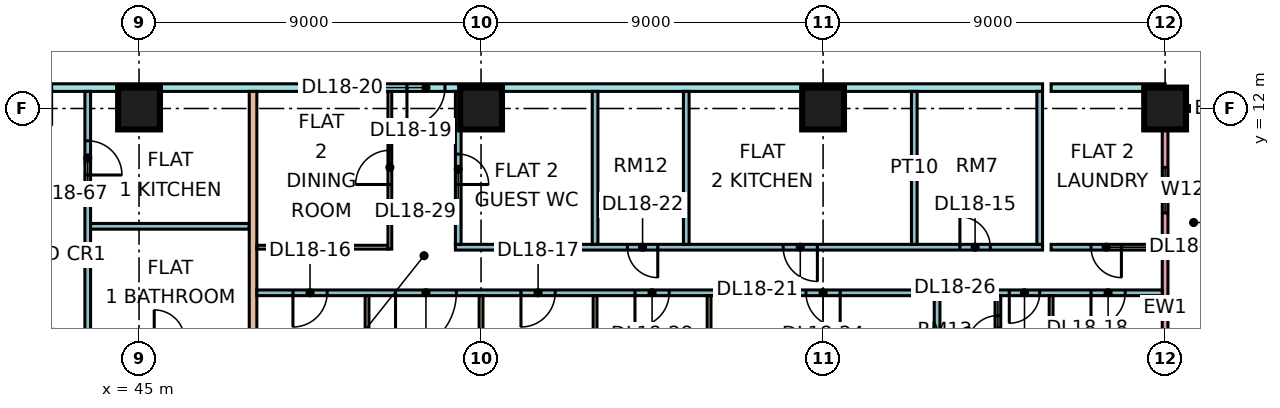
"""IFC4 building model, lengths in metres.
Left out: names, types, materials, properties, quantities, classifications, styles, units other than length and angle.
Written with IfcOpenShell. Run it as: python <this file> out.ifc"""

import sys

from ifc_helpers import new_model, si_unit, direction, frame, frame_2d, origin, origin_2d, place, context, subcontext, project, spatial, rectangle, extrude, element, fill, save


model = new_model("IFC4")
c1 = context("Model", 3, precision=1e-05, world=origin(), true_north=direction((0.0, 1.0)))
c2 = subcontext(c1, "Body", "Model", "MODEL_VIEW")
j1 = project(units=[si_unit("LENGTHUNIT", "METRE"), si_unit("PLANEANGLEUNIT", "RADIAN")], contexts=[c1])
p1 = place(None, origin())
s1 = spatial("IfcSite", under=j1, at=p1, CompositionType="ELEMENT")
p2 = place(p1, origin())
s2 = spatial("IfcBuilding", under=s1, at=p2, CompositionType="ELEMENT")
p3 = place(p2, frame((0.0, 0.0, 82.65)))
s3 = spatial("IfcBuildingStorey", under=s2, at=p3, CompositionType="ELEMENT", Elevation=82.65)
for number, where, z_axis, x_axis in (
    (1, (45.0, 12.0, 0.0), (0.0, 0.0, 1.0), (1.0, 0.0, 0.0)),
    (2, (54.0, 12.0, 0.0), (0.0, 0.0, 1.0), (1.0, 0.0, 0.0)),
    (3, (63.0, 12.0, 0.0), (0.0, 0.0, 1.0), (1.0, 0.0, 0.0)),
    (4, (72.0, 12.0, 0.0), (0.0, 0.0, 1.0), (1.0, 0.0, 0.0)),
):
    element("IfcColumn", number, at=place(p3, frame(where, z_axis=z_axis, x_axis=x_axis)), inside=s3, PredefinedType="COLUMN", context=c2, shape_type="SweptSolid", body=[
        extrude(rectangle(XDim=1.1, YDim=1.1, at=origin_2d()), origin(), (0.0, 0.0, 1.0), 3.75),
    ])
p4 = place(p3, frame((72.0, 1.575, 0.0), z_axis=(0.0, 0.0, 1.0), x_axis=(0.0, 1.0, 0.0)))
e5 = element("IfcWall", 5, at=p4, inside=s3, PredefinedType="SOLIDWALL", context=c2, shape_type="SweptSolid", body=[
    extrude(rectangle(XDim=10.35, YDim=0.15, at=frame_2d((5.175, 0.0))), origin(), (0.0, 0.0, 1.0), 3.3),
])
p5 = place(p4, frame((1.887, 0.0, 0.0)))
e6 = element("IfcOpeningElement", 6, at=p5, cuts=e5, PredefinedType="OPENING", context=c2, shape_type="SweptSolid", body=[
    extrude(rectangle(XDim=1.8, YDim=2.4, at=frame_2d((0.9, 1.2))), frame((0.0, 0.085, 0.0), z_axis=(0.0, -1.0, 0.0), x_axis=(1.0, 0.0, 0.0)), (0.0, 0.0, 1.0), 0.17),
])
p6 = place(p4, frame((7.675, 0.0, 1.7)))
e7 = element("IfcOpeningElement", 7, at=p6, cuts=e5, PredefinedType="OPENING", context=c2, shape_type="SweptSolid", body=[
    extrude(rectangle(XDim=1.2, YDim=0.9, at=frame_2d((0.6, 0.45))), frame((0.0, 0.085, 0.0), z_axis=(0.0, -1.0, 0.0), x_axis=(1.0, 0.0, 0.0)), (0.0, 0.0, 1.0), 0.17),
])
p7 = place(p3, frame((73.5, 12.0, 0.0), z_axis=(0.0, 0.0, 1.0), x_axis=(-1.0, 0.0, 0.0)))
e8 = element("IfcWall", 8, at=p7, inside=s3, PredefinedType="SOLIDWALL", context=c2, shape_type="SweptSolid", body=[
    extrude(rectangle(XDim=1.5, YDim=0.15, at=frame_2d((0.75, 0.0))), origin(), (0.0, 0.0, 1.0), 3.3),
])
p8 = place(p3, frame((40.65, 12.55, 0.0), z_axis=(0.0, 0.0, 1.0), x_axis=(1.0, 0.0, 0.0)))
e9 = element("IfcWall", 9, at=p8, inside=s3, PredefinedType="PARTITIONING", context=c2, shape_type="SweptSolid", body=[
    extrude(rectangle(XDim=28.125, YDim=0.2, at=frame_2d((14.062, 0.0))), origin(), (0.0, 0.0, 1.0), 3.3),
])
p9 = place(p8, frame((11.4, 0.0, 0.0)))
e10 = element("IfcOpeningElement", 10, at=p9, cuts=e9, PredefinedType="OPENING", context=c2, shape_type="SweptSolid", body=[
    extrude(rectangle(XDim=1.0, YDim=2.1, at=frame_2d((0.5, 1.05))), frame((0.0, 0.11, 0.0), z_axis=(0.0, -1.0, 0.0), x_axis=(1.0, 0.0, 0.0)), (0.0, 0.0, 1.0), 0.22),
])
p10 = place(p8, frame((1.05, 0.0, 0.0)))
e11 = element("IfcOpeningElement", 11, at=p10, cuts=e9, PredefinedType="OPENING", context=c2, shape_type="SweptSolid", body=[
    extrude(rectangle(XDim=1.0, YDim=2.1, at=frame_2d((0.5, 1.05))), frame((0.0, 0.11, 0.0), z_axis=(0.0, -1.0, 0.0), x_axis=(1.0, 0.0, 0.0)), (0.0, 0.0, 1.0), 0.22),
])
p11 = place(p3, frame((43.65, 5.825, 0.0), z_axis=(0.0, 0.0, 1.0), x_axis=(0.0, 1.0, 0.0)))
e12 = element("IfcWall", 12, at=p11, inside=s3, PredefinedType="PARTITIONING", context=c2, shape_type="SweptSolid", body=[
    extrude(rectangle(XDim=6.625, YDim=0.15, at=frame_2d((3.312, 0.0))), origin(), (0.0, 0.0, 1.0), 3.3),
])
p12 = place(p11, frame((4.425, 0.0, 0.0)))
e13 = element("IfcOpeningElement", 13, at=p12, cuts=e12, PredefinedType="OPENING", context=c2, shape_type="SweptSolid", body=[
    extrude(rectangle(XDim=0.9, YDim=2.1, at=frame_2d((0.45, 1.05))), frame((0.0, 0.085, 0.0), z_axis=(0.0, -1.0, 0.0), x_axis=(1.0, 0.0, 0.0)), (0.0, 0.0, 1.0), 0.17),
])
p13 = place(p3, frame((43.725, 8.9, 0.0), z_axis=(0.0, 0.0, 1.0), x_axis=(1.0, 0.0, 0.0)))
e14 = element("IfcWall", 14, at=p13, inside=s3, PredefinedType="PARTITIONING", context=c2, shape_type="SweptSolid", body=[
    extrude(rectangle(XDim=4.175, YDim=0.15, at=frame_2d((2.087, 0.0))), origin(), (0.0, 0.0, 1.0), 3.3),
])
p14 = place(p3, frame((48.0, 0.0, 0.0), z_axis=(0.0, 0.0, 1.0), x_axis=(0.0, 1.0, 0.0)))
e15 = element("IfcWall", 15, at=p14, inside=s3, PredefinedType="PARTITIONING", context=c2, shape_type="SweptSolid", body=[
    extrude(rectangle(XDim=12.45, YDim=0.2, at=frame_2d((6.225, 0.0))), origin(), (0.0, 0.0, 1.0), 3.3),
])
p15 = place(p3, frame((48.1, 7.15, 0.0), z_axis=(0.0, 0.0, 1.0), x_axis=(1.0, 0.0, 0.0)))
e16 = element("IfcWall", 16, at=p15, inside=s3, PredefinedType="PARTITIONING", context=c2, shape_type="SweptSolid", body=[
    extrude(rectangle(XDim=23.826, YDim=0.15, at=frame_2d((11.913, 0.0))), origin(), (0.0, 0.0, 1.0), 3.3),
])
p16 = place(p15, frame((0.95, 0.0, 0.0)))
e17 = element("IfcOpeningElement", 17, at=p16, cuts=e16, PredefinedType="OPENING", context=c2, shape_type="SweptSolid", body=[
    extrude(rectangle(XDim=0.9, YDim=2.1, at=frame_2d((0.45, 1.05))), frame((0.0, 0.085, 0.0), z_axis=(0.0, -1.0, 0.0), x_axis=(1.0, 0.0, 0.0)), (0.0, 0.0, 1.0), 0.17),
])
p17 = place(p15, frame((6.95, 0.0, 0.0)))
e18 = element("IfcOpeningElement", 18, at=p17, cuts=e16, PredefinedType="OPENING", context=c2, shape_type="SweptSolid", body=[
    extrude(rectangle(XDim=0.9, YDim=2.1, at=frame_2d((0.45, 1.05))), frame((0.0, 0.085, 0.0), z_axis=(0.0, -1.0, 0.0), x_axis=(1.0, 0.0, 0.0)), (0.0, 0.0, 1.0), 0.17),
])
p18 = place(p15, frame((21.95, 0.0, 0.0)))
e19 = element("IfcOpeningElement", 19, at=p18, cuts=e16, PredefinedType="OPENING", context=c2, shape_type="SweptSolid", body=[
    extrude(rectangle(XDim=0.9, YDim=2.1, at=frame_2d((0.45, 1.05))), frame((0.0, 0.085, 0.0), z_axis=(0.0, -1.0, 0.0), x_axis=(1.0, 0.0, 0.0)), (0.0, 0.0, 1.0), 0.17),
])
p19 = place(p15, frame((14.45, 0.0, 0.0)))
e20 = element("IfcOpeningElement", 20, at=p19, cuts=e16, PredefinedType="OPENING", context=c2, shape_type="SweptSolid", body=[
    extrude(rectangle(XDim=0.9, YDim=2.1, at=frame_2d((0.45, 1.05))), frame((0.0, 0.085, 0.0), z_axis=(0.0, -1.0, 0.0), x_axis=(1.0, 0.0, 0.0)), (0.0, 0.0, 1.0), 0.17),
])
p20 = place(p15, frame((19.8, 0.0, 0.0)))
e21 = element("IfcOpeningElement", 21, at=p20, cuts=e16, PredefinedType="OPENING", context=c2, shape_type="SweptSolid", body=[
    extrude(rectangle(XDim=0.8, YDim=2.1, at=frame_2d((0.4, 1.05))), frame((0.0, 0.085, 0.0), z_axis=(0.0, -1.0, 0.0), x_axis=(1.0, 0.0, 0.0)), (0.0, 0.0, 1.0), 0.17),
])
p21 = place(p15, frame((3.65, 0.0, 0.0)))
e22 = element("IfcOpeningElement", 22, at=p21, cuts=e16, PredefinedType="OPENING", context=c2, shape_type="SweptSolid", body=[
    extrude(rectangle(XDim=1.6, YDim=2.1, at=frame_2d((0.8, 1.05))), frame((0.0, 0.085, 0.0), z_axis=(0.0, -1.0, 0.0), x_axis=(1.0, 0.0, 0.0)), (0.0, 0.0, 1.0), 0.17),
])
p22 = place(p15, frame((9.95, 0.0, 0.0)))
e23 = element("IfcOpeningElement", 23, at=p22, cuts=e16, PredefinedType="OPENING", context=c2, shape_type="SweptSolid", body=[
    extrude(rectangle(XDim=0.9, YDim=2.1, at=frame_2d((0.45, 1.05))), frame((0.0, 0.085, 0.0), z_axis=(0.0, -1.0, 0.0), x_axis=(1.0, 0.0, 0.0)), (0.0, 0.0, 1.0), 0.17),
])
p23 = place(p3, frame((48.1, 8.35, 0.0), z_axis=(0.0, 0.0, 1.0), x_axis=(1.0, 0.0, 0.0)))
e24 = element("IfcWall", 24, at=p23, inside=s3, PredefinedType="PARTITIONING", context=c2, shape_type="SweptSolid", body=[
    extrude(rectangle(XDim=3.45, YDim=0.1, at=frame_2d((1.725, 0.0))), origin(), (0.0, 0.0, 1.0), 3.3),
])
p24 = place(p3, frame((51.0, 0.074, 0.0), z_axis=(0.0, 0.0, 1.0), x_axis=(0.0, 1.0, 0.0)))
e25 = element("IfcWall", 25, at=p24, inside=s3, PredefinedType="PARTITIONING", context=c2, shape_type="SweptSolid", body=[
    extrude(rectangle(XDim=7.001, YDim=0.1, at=frame_2d((3.5, 0.0))), origin(), (0.0, 0.0, 1.0), 3.3),
])
p25 = place(p3, frame((51.6, 8.3, 0.0), z_axis=(0.0, 0.0, 1.0), x_axis=(0.0, 1.0, 0.0)))
e26 = element("IfcWall", 26, at=p25, inside=s3, PredefinedType="PARTITIONING", context=c2, shape_type="SweptSolid", body=[
    extrude(rectangle(XDim=4.15, YDim=0.1, at=frame_2d((2.075, 0.0))), origin(), (0.0, 0.0, 1.0), 3.3),
])
p26 = place(p25, frame((1.7, 0.0, 0.0)))
e27 = element("IfcOpeningElement", 27, at=p26, cuts=e26, PredefinedType="OPENING", context=c2, shape_type="SweptSolid", body=[
    extrude(rectangle(XDim=0.9, YDim=2.1, at=frame_2d((0.45, 1.05))), frame((0.0, 0.06, 0.0), z_axis=(0.0, -1.0, 0.0), x_axis=(1.0, 0.0, 0.0)), (0.0, 0.0, 1.0), 0.12),
])
p27 = place(p3, frame((53.325, 8.35, 0.0), z_axis=(0.0, 0.0, 1.0), x_axis=(1.0, 0.0, 0.0)))
e28 = element("IfcWall", 28, at=p27, inside=s3, PredefinedType="PARTITIONING", context=c2, shape_type="SweptSolid", body=[
    extrude(rectangle(XDim=15.45, YDim=0.15, at=frame_2d((7.725, 0.0))), origin(), (0.0, 0.0, 1.0), 3.3),
])
p28 = place(p27, frame((13.275, 0.0, 0.0)))
e29 = element("IfcOpeningElement", 29, at=p28, cuts=e28, PredefinedType="OPENING", context=c2, shape_type="SweptSolid", body=[
    extrude(rectangle(XDim=0.8, YDim=2.1, at=frame_2d((0.4, 1.05))), frame((0.0, 0.085, 0.0), z_axis=(0.0, -1.0, 0.0), x_axis=(1.0, 0.0, 0.0)), (0.0, 0.0, 1.0), 0.17),
])
p29 = place(p27, frame((8.625, 0.0, 0.0)))
e30 = element("IfcOpeningElement", 30, at=p29, cuts=e28, PredefinedType="OPENING", context=c2, shape_type="SweptSolid", body=[
    extrude(rectangle(XDim=0.9, YDim=2.1, at=frame_2d((0.45, 1.05))), frame((0.0, 0.085, 0.0), z_axis=(0.0, -1.0, 0.0), x_axis=(1.0, 0.0, 0.0)), (0.0, 0.0, 1.0), 0.17),
])
p30 = place(p27, frame((4.525, 0.0, 0.0)))
e31 = element("IfcOpeningElement", 31, at=p30, cuts=e28, PredefinedType="OPENING", context=c2, shape_type="SweptSolid", body=[
    extrude(rectangle(XDim=0.8, YDim=2.1, at=frame_2d((0.4, 1.05))), frame((0.0, 0.085, 0.0), z_axis=(0.0, -1.0, 0.0), x_axis=(1.0, 0.0, 0.0)), (0.0, 0.0, 1.0), 0.17),
])
p31 = place(p3, frame((53.4, 8.425, 0.0), z_axis=(0.0, 0.0, 1.0), x_axis=(0.0, 1.0, 0.0)))
e32 = element("IfcWall", 32, at=p31, inside=s3, PredefinedType="PARTITIONING", context=c2, shape_type="SweptSolid", body=[
    extrude(rectangle(XDim=4.025, YDim=0.15, at=frame_2d((2.012, 0.0))), origin(), (0.0, 0.0, 1.0), 3.3),
])
p32 = place(p31, frame((1.575, 0.0, 0.0)))
e33 = element("IfcOpeningElement", 33, at=p32, cuts=e32, PredefinedType="OPENING", context=c2, shape_type="SweptSolid", body=[
    extrude(rectangle(XDim=0.8, YDim=2.1, at=frame_2d((0.4, 1.05))), frame((0.0, 0.085, 0.0), z_axis=(0.0, -1.0, 0.0), x_axis=(1.0, 0.0, 0.0)), (0.0, 0.0, 1.0), 0.17),
])
for number, where, z_axis, x_axis in (
    (34, (54.0, 0.074, 0.0), (0.0, 0.0, 1.0), (0.0, 1.0, 0.0)),
    (35, (57.0, 0.074, 0.0), (0.0, 0.0, 1.0), (0.0, 1.0, 0.0)),
):
    element("IfcWall", number, at=place(p3, frame(where, z_axis=z_axis, x_axis=x_axis)), inside=s3, PredefinedType="PARTITIONING", context=c2, shape_type="SweptSolid", body=[
        extrude(rectangle(XDim=7.001, YDim=0.1, at=frame_2d((3.5, 0.0))), origin(), (0.0, 0.0, 1.0), 3.3),
    ])
for number, where, z_axis, x_axis in (
    (36, (57.0, 8.425, 0.0), (0.0, 0.0, 1.0), (0.0, 1.0, 0.0)),
    (37, (59.4, 8.425, 0.0), (0.0, 0.0, 1.0), (0.0, 1.0, 0.0)),
):
    element("IfcWall", number, at=place(p3, frame(where, z_axis=z_axis, x_axis=x_axis)), inside=s3, PredefinedType="PARTITIONING", context=c2, shape_type="SweptSolid", body=[
        extrude(rectangle(XDim=4.025, YDim=0.15, at=frame_2d((2.012, 0.0))), origin(), (0.0, 0.0, 1.0), 3.3),
    ])
p33 = place(p3, frame((60.0, 0.0, 0.0), z_axis=(0.0, 0.0, 1.0), x_axis=(0.0, 1.0, 0.0)))
e38 = element("IfcWall", 38, at=p33, inside=s3, PredefinedType="PARTITIONING", context=c2, shape_type="SweptSolid", body=[
    extrude(rectangle(XDim=7.075, YDim=0.1, at=frame_2d((3.538, 0.0))), origin(), (0.0, 0.0, 1.0), 3.3),
])
p34 = place(p3, frame((65.4, 8.425, 0.0), z_axis=(0.0, 0.0, 1.0), x_axis=(0.0, 1.0, 0.0)))
e39 = element("IfcWall", 39, at=p34, inside=s3, PredefinedType="PARTITIONING", context=c2, shape_type="SweptSolid", body=[
    extrude(rectangle(XDim=4.025, YDim=0.15, at=frame_2d((2.012, 0.0))), origin(), (0.0, 0.0, 1.0), 3.3),
])
p35 = place(p3, frame((66.0, -1.35, 0.0), z_axis=(0.0, 0.0, 1.0), x_axis=(0.0, 1.0, 0.0)))
e40 = element("IfcWall", 40, at=p35, inside=s3, PredefinedType="PARTITIONING", context=c2, shape_type="SweptSolid", body=[
    extrude(rectangle(XDim=8.425, YDim=0.15, at=frame_2d((4.212, 0.0))), origin(), (0.0, 0.0, 1.0), 3.3),
])
p36 = place(p3, frame((67.6, 5.075, 0.0), z_axis=(0.0, 0.0, 1.0), x_axis=(0.0, 1.0, 0.0)))
e41 = element("IfcWall", 41, at=p36, inside=s3, PredefinedType="PARTITIONING", context=c2, shape_type="SweptSolid", body=[
    extrude(rectangle(XDim=2.0, YDim=0.15, at=frame_2d((1.0, 0.0))), origin(), (0.0, 0.0, 1.0), 3.3),
])
p37 = place(p36, frame((0.675, 0.0, 0.0)))
e42 = element("IfcOpeningElement", 42, at=p37, cuts=e41, PredefinedType="OPENING", context=c2, shape_type="SweptSolid", body=[
    extrude(rectangle(XDim=0.8, YDim=2.1, at=frame_2d((0.4, 1.05))), frame((0.0, 0.085, 0.0), z_axis=(0.0, -1.0, 0.0), x_axis=(1.0, 0.0, 0.0)), (0.0, 0.0, 1.0), 0.17),
])
p38 = place(p3, frame((68.7, 8.425, 0.0), z_axis=(0.0, 0.0, 1.0), x_axis=(0.0, 1.0, 0.0)))
e43 = element("IfcWall", 43, at=p38, inside=s3, PredefinedType="PARTITIONING", context=c2, shape_type="SweptSolid", body=[
    extrude(rectangle(XDim=4.025, YDim=0.15, at=frame_2d((2.012, 0.0))), origin(), (0.0, 0.0, 1.0), 3.3),
])
p39 = place(p3, frame((69.0, -1.351, 0.0), z_axis=(0.0, 0.0, 1.0), x_axis=(0.0, 1.0, 0.0)))
e44 = element("IfcWall", 44, at=p39, inside=s3, PredefinedType="PARTITIONING", context=c2, shape_type="SweptSolid", body=[
    extrude(rectangle(XDim=8.426, YDim=0.1, at=frame_2d((4.213, 0.0))), origin(), (0.0, 0.0, 1.0), 3.3),
])
p40 = place(p3, frame((69.0, 8.35, 0.0), z_axis=(0.0, 0.0, 1.0), x_axis=(1.0, 0.0, 0.0)))
e45 = element("IfcWall", 45, at=p40, inside=s3, PredefinedType="PARTITIONING", context=c2, shape_type="SweptSolid", body=[
    extrude(rectangle(XDim=2.926, YDim=0.15, at=frame_2d((1.463, 0.0))), origin(), (0.0, 0.0, 1.0), 3.3),
])
p41 = place(p40, frame((1.05, 0.0, 0.0)))
e46 = element("IfcOpeningElement", 46, at=p41, cuts=e45, PredefinedType="OPENING", context=c2, shape_type="SweptSolid", body=[
    extrude(rectangle(XDim=0.8, YDim=2.1, at=frame_2d((0.4, 1.05))), frame((0.0, 0.085, 0.0), z_axis=(0.0, -1.0, 0.0), x_axis=(1.0, 0.0, 0.0)), (0.0, 0.0, 1.0), 0.17),
])
p42 = place(p3, frame((69.0, 12.55, 0.0), z_axis=(0.0, 0.0, 1.0), x_axis=(1.0, 0.0, 0.0)))
e47 = element("IfcWall", 47, at=p42, inside=s3, PredefinedType="PARTITIONING", context=c2, shape_type="SweptSolid", body=[
    extrude(rectangle(XDim=3.0, YDim=0.2, at=frame_2d((1.5, 0.0))), origin(), (0.0, 0.0, 1.0), 3.3),
])
p43 = place(p6, origin())
e48 = element("IfcWindow", 48, at=p43, inside=s3, PartitioningType="SINGLE_PANEL", PredefinedType="WINDOW", context=c2, shape_type="SweptSolid", body=[
    extrude(rectangle(XDim=1.2, YDim=0.9, at=frame_2d((0.6, 0.45))), frame((0.0, 0.03, 0.0), z_axis=(0.0, -1.0, 0.0), x_axis=(1.0, 0.0, 0.0)), (0.0, 0.0, 1.0), 0.06),
])
fill(e7, e48)
p44 = place(p28, origin())
e49 = element("IfcDoor", 49, at=p44, inside=s3, OperationType="SINGLE_SWING_LEFT", PredefinedType="DOOR", context=c2, shape_type="SweptSolid", body=[
    extrude(rectangle(XDim=0.8, YDim=2.1, at=frame_2d((0.4, 1.05))), frame((0.0, 0.025, 0.0), z_axis=(0.0, -1.0, 0.0), x_axis=(1.0, 0.0, 0.0)), (0.0, 0.0, 1.0), 0.05),
])
fill(e29, e49)
p45 = place(p16, frame((0.9, 0.0, 0.0), z_axis=(0.0, 0.0, 1.0), x_axis=(-1.0, 0.0, 0.0)))
e50 = element("IfcDoor", 50, at=p45, inside=s3, OperationType="SINGLE_SWING_LEFT", PredefinedType="DOOR", context=c2, shape_type="SweptSolid", body=[
    extrude(rectangle(XDim=0.9, YDim=2.1, at=frame_2d((0.45, 1.05))), frame((0.0, 0.025, 0.0), z_axis=(0.0, -1.0, 0.0), x_axis=(1.0, 0.0, 0.0)), (0.0, 0.0, 1.0), 0.05),
])
fill(e17, e50)
p46 = place(p17, frame((0.9, 0.0, 0.0), z_axis=(0.0, 0.0, 1.0), x_axis=(-1.0, 0.0, 0.0)))
e51 = element("IfcDoor", 51, at=p46, inside=s3, OperationType="SINGLE_SWING_LEFT", PredefinedType="DOOR", context=c2, shape_type="SweptSolid", body=[
    extrude(rectangle(XDim=0.9, YDim=2.1, at=frame_2d((0.45, 1.05))), frame((0.0, 0.025, 0.0), z_axis=(0.0, -1.0, 0.0), x_axis=(1.0, 0.0, 0.0)), (0.0, 0.0, 1.0), 0.05),
])
fill(e18, e51)
p47 = place(p18, frame((0.9, 0.0, 0.0), z_axis=(0.0, 0.0, 1.0), x_axis=(-1.0, 0.0, 0.0)))
e52 = element("IfcDoor", 52, at=p47, inside=s3, OperationType="SINGLE_SWING_LEFT", PredefinedType="DOOR", context=c2, shape_type="SweptSolid", body=[
    extrude(rectangle(XDim=0.9, YDim=2.1, at=frame_2d((0.45, 1.05))), frame((0.0, 0.025, 0.0), z_axis=(0.0, -1.0, 0.0), x_axis=(1.0, 0.0, 0.0)), (0.0, 0.0, 1.0), 0.05),
])
fill(e19, e52)
p48 = place(p26, origin())
e53 = element("IfcDoor", 53, at=p48, inside=s3, OperationType="SINGLE_SWING_LEFT", PredefinedType="DOOR", context=c2, shape_type="SweptSolid", body=[
    extrude(rectangle(XDim=0.9, YDim=2.1, at=frame_2d((0.45, 1.05))), frame((0.0, 0.025, 0.0), z_axis=(0.0, -1.0, 0.0), x_axis=(1.0, 0.0, 0.0)), (0.0, 0.0, 1.0), 0.05),
])
fill(e27, e53)
p49 = place(p9, frame((1.0, 0.0, 0.0), z_axis=(0.0, 0.0, 1.0), x_axis=(-1.0, 0.0, 0.0)))
e54 = element("IfcDoor", 54, at=p49, inside=s3, OperationType="SINGLE_SWING_LEFT", PredefinedType="DOOR", context=c2, shape_type="SweptSolid", body=[
    extrude(rectangle(XDim=1.0, YDim=2.1, at=frame_2d((0.5, 1.05))), frame((0.0, 0.025, 0.0), z_axis=(0.0, -1.0, 0.0), x_axis=(1.0, 0.0, 0.0)), (0.0, 0.0, 1.0), 0.05),
])
fill(e10, e54)
p50 = place(p29, origin())
e55 = element("IfcDoor", 55, at=p50, inside=s3, OperationType="SINGLE_SWING_RIGHT", PredefinedType="DOOR", context=c2, shape_type="SweptSolid", body=[
    extrude(rectangle(XDim=0.9, YDim=2.1, at=frame_2d((0.45, 1.05))), frame((0.0, 0.025, 0.0), z_axis=(0.0, -1.0, 0.0), x_axis=(1.0, 0.0, 0.0)), (0.0, 0.0, 1.0), 0.05),
])
fill(e30, e55)
p51 = place(p30, origin())
e56 = element("IfcDoor", 56, at=p51, inside=s3, OperationType="SINGLE_SWING_RIGHT", PredefinedType="DOOR", context=c2, shape_type="SweptSolid", body=[
    extrude(rectangle(XDim=0.8, YDim=2.1, at=frame_2d((0.4, 1.05))), frame((0.0, 0.025, 0.0), z_axis=(0.0, -1.0, 0.0), x_axis=(1.0, 0.0, 0.0)), (0.0, 0.0, 1.0), 0.05),
])
fill(e31, e56)
p52 = place(p41, origin())
e57 = element("IfcDoor", 57, at=p52, inside=s3, OperationType="SINGLE_SWING_RIGHT", PredefinedType="DOOR", context=c2, shape_type="SweptSolid", body=[
    extrude(rectangle(XDim=0.8, YDim=2.1, at=frame_2d((0.4, 1.05))), frame((0.0, 0.025, 0.0), z_axis=(0.0, -1.0, 0.0), x_axis=(1.0, 0.0, 0.0)), (0.0, 0.0, 1.0), 0.05),
])
fill(e46, e57)
p53 = place(p19, origin())
e58 = element("IfcDoor", 58, at=p53, inside=s3, OperationType="SINGLE_SWING_RIGHT", PredefinedType="DOOR", context=c2, shape_type="SweptSolid", body=[
    extrude(rectangle(XDim=0.9, YDim=2.1, at=frame_2d((0.45, 1.05))), frame((0.0, 0.025, 0.0), z_axis=(0.0, -1.0, 0.0), x_axis=(1.0, 0.0, 0.0)), (0.0, 0.0, 1.0), 0.05),
])
fill(e20, e58)
p54 = place(p20, frame((0.8, 0.0, 0.0), z_axis=(0.0, 0.0, 1.0), x_axis=(-1.0, 0.0, 0.0)))
e59 = element("IfcDoor", 59, at=p54, inside=s3, OperationType="SINGLE_SWING_LEFT", PredefinedType="DOOR", context=c2, shape_type="SweptSolid", body=[
    extrude(rectangle(XDim=0.8, YDim=2.1, at=frame_2d((0.4, 1.05))), frame((0.0, 0.025, 0.0), z_axis=(0.0, -1.0, 0.0), x_axis=(1.0, 0.0, 0.0)), (0.0, 0.0, 1.0), 0.05),
])
fill(e21, e59)
p55 = place(p37, origin())
e60 = element("IfcDoor", 60, at=p55, inside=s3, OperationType="SINGLE_SWING_LEFT", PredefinedType="DOOR", context=c2, shape_type="SweptSolid", body=[
    extrude(rectangle(XDim=0.8, YDim=2.1, at=frame_2d((0.4, 1.05))), frame((0.0, 0.025, 0.0), z_axis=(0.0, -1.0, 0.0), x_axis=(1.0, 0.0, 0.0)), (0.0, 0.0, 1.0), 0.05),
])
fill(e42, e60)
p56 = place(p21, frame((1.6, 0.0, 0.0), z_axis=(0.0, 0.0, 1.0), x_axis=(-1.0, 0.0, 0.0)))
e61 = element("IfcDoor", 61, at=p56, inside=s3, OperationType="DOUBLE_DOOR_SINGLE_SWING", PredefinedType="DOOR", context=c2, shape_type="SweptSolid", body=[
    extrude(rectangle(XDim=1.6, YDim=2.1, at=frame_2d((0.8, 1.05))), frame((0.0, 0.025, 0.0), z_axis=(0.0, -1.0, 0.0), x_axis=(1.0, 0.0, 0.0)), (0.0, 0.0, 1.0), 0.05),
])
fill(e22, e61)
p57 = place(p22, frame((0.9, 0.0, 0.0), z_axis=(0.0, 0.0, 1.0), x_axis=(-1.0, 0.0, 0.0)))
e62 = element("IfcDoor", 62, at=p57, inside=s3, OperationType="SINGLE_SWING_LEFT", PredefinedType="DOOR", context=c2, shape_type="SweptSolid", body=[
    extrude(rectangle(XDim=0.9, YDim=2.1, at=frame_2d((0.45, 1.05))), frame((0.0, 0.025, 0.0), z_axis=(0.0, -1.0, 0.0), x_axis=(1.0, 0.0, 0.0)), (0.0, 0.0, 1.0), 0.05),
])
fill(e23, e62)
p58 = place(p32, frame((0.8, 0.0, 0.0), z_axis=(0.0, 0.0, 1.0), x_axis=(-1.0, 0.0, 0.0)))
e63 = element("IfcDoor", 63, at=p58, inside=s3, OperationType="SINGLE_SWING_LEFT", PredefinedType="DOOR", context=c2, shape_type="SweptSolid", body=[
    extrude(rectangle(XDim=0.8, YDim=2.1, at=frame_2d((0.4, 1.05))), frame((0.0, 0.025, 0.0), z_axis=(0.0, -1.0, 0.0), x_axis=(1.0, 0.0, 0.0)), (0.0, 0.0, 1.0), 0.05),
])
fill(e33, e63)
p59 = place(p12, frame((0.9, 0.0, 0.0), z_axis=(0.0, 0.0, 1.0), x_axis=(-1.0, 0.0, 0.0)))
e64 = element("IfcDoor", 64, at=p59, inside=s3, OperationType="SINGLE_SWING_LEFT", PredefinedType="DOOR", context=c2, shape_type="SweptSolid", body=[
    extrude(rectangle(XDim=0.9, YDim=2.1, at=frame_2d((0.45, 1.05))), frame((0.0, 0.025, 0.0), z_axis=(0.0, -1.0, 0.0), x_axis=(1.0, 0.0, 0.0)), (0.0, 0.0, 1.0), 0.05),
])
fill(e13, e64)
save(model, sys.argv[1])
